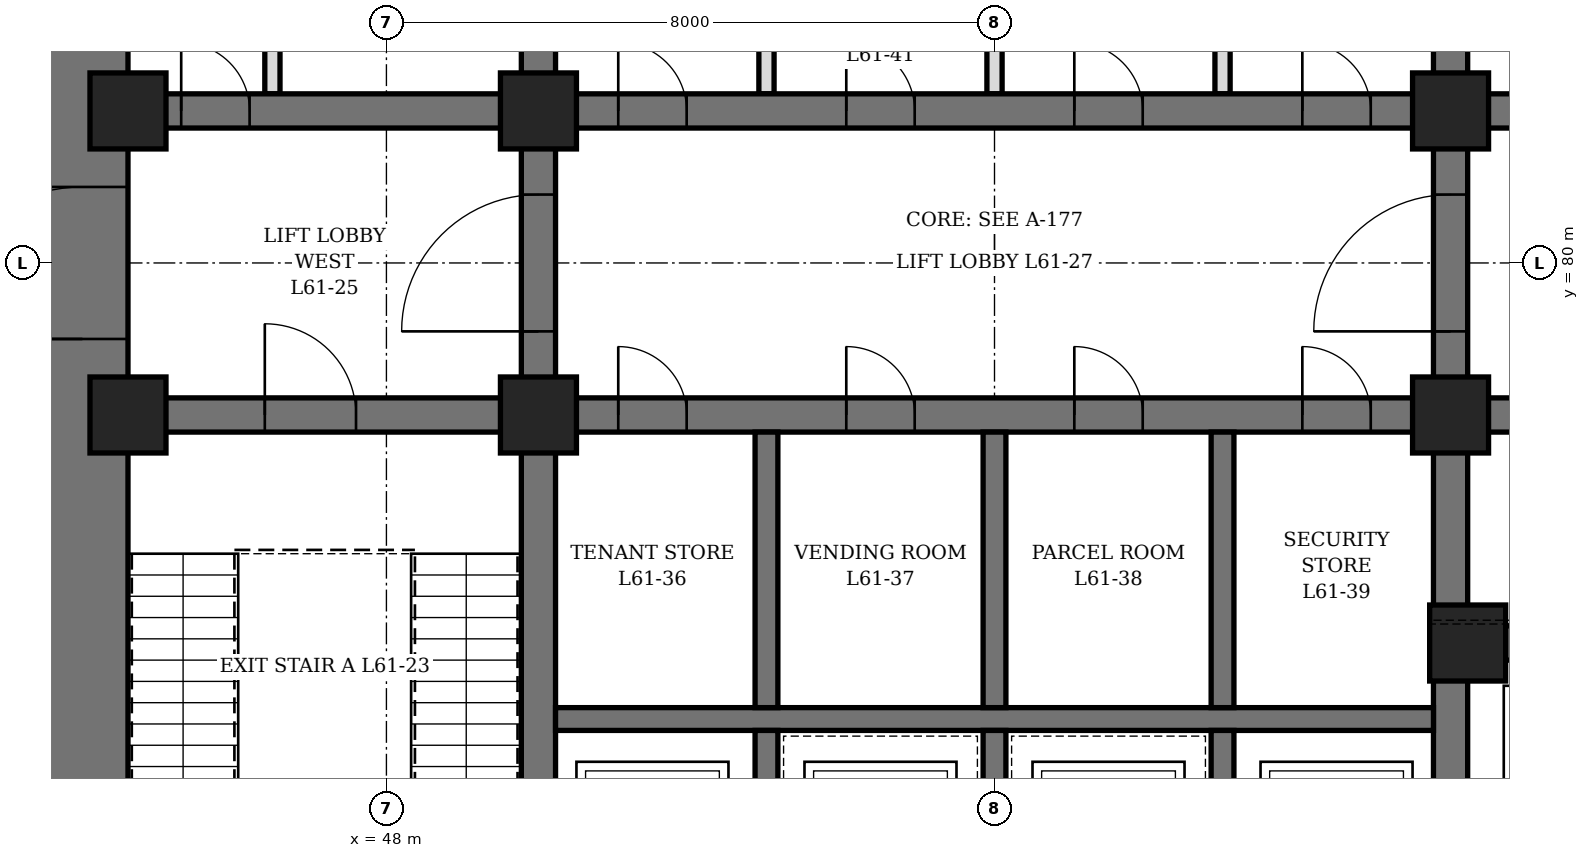
"""IFC4 building model, lengths in metres.
Left out: names, types, materials, properties, quantities, classifications, styles, units other than length and angle.
Written with IfcOpenShell. Run it as: python <this file> out.ifc"""

import sys

from ifc_helpers import new_model, si_unit, direction, frame, frame_2d, origin, origin_2d, place, context, subcontext, project, spatial, rectangle, hollow_rectangle, extrude, element, fill, save


model = new_model("IFC4")
c1 = context("Model", 3, precision=1e-05, world=origin(), true_north=direction((0.0, 1.0)))
c2 = subcontext(c1, "Body", "Model", "MODEL_VIEW")
j1 = project(units=[si_unit("LENGTHUNIT", "METRE"), si_unit("PLANEANGLEUNIT", "RADIAN")], contexts=[c1])
p1 = place(None, origin())
s1 = spatial("IfcSite", under=j1, at=p1, CompositionType="ELEMENT")
p2 = place(p1, origin())
s2 = spatial("IfcBuilding", under=s1, at=p2, CompositionType="ELEMENT")
p3 = place(p2, frame((0.0, 0.0, 271.3)))
s3 = spatial("IfcBuildingStorey", under=s2, at=p3, CompositionType="ELEMENT", Elevation=271.3)
p4 = place(p3, frame((44.0, 70.4, 0.0), z_axis=(0.0, 0.0, 1.0), x_axis=(0.0, 1.0, 0.0)))
e1 = element("IfcWall", 1, at=p4, inside=s3, PredefinedType="SHEAR", context=c2, shape_type="SweptSolid", body=[
    extrude(rectangle(XDim=19.2, YDim=1.2, at=frame_2d((9.6, 0.0))), origin(), (0.0, 0.0, 1.0), 4.2),
])
p5 = place(p4, frame((8.6, 0.0, 0.0)))
e2 = element("IfcOpeningElement", 2, at=p5, cuts=e1, PredefinedType="OPENING", context=c2, shape_type="SweptSolid", body=[
    extrude(rectangle(XDim=2.0, YDim=2.4, at=frame_2d((1.0, 1.2))), frame((0.0, 0.61, 0.0), z_axis=(0.0, -1.0, 0.0), x_axis=(1.0, 0.0, 0.0)), (0.0, 0.0, 1.0), 1.22),
])
p6 = place(p3, frame((50.0, 71.6, 0.0), z_axis=(0.0, 0.0, 1.0), x_axis=(0.0, 1.0, 0.0)))
e3 = element("IfcWall", 3, at=p6, inside=s3, PredefinedType="SHEAR", context=c2, shape_type="SweptSolid", body=[
    extrude(rectangle(XDim=16.8, YDim=0.45, at=frame_2d((8.4, 0.0))), origin(), (0.0, 0.0, 1.0), 4.2),
])
p7 = place(p6, frame((7.5, 0.0, 0.0)))
e4 = element("IfcOpeningElement", 4, at=p7, cuts=e3, PredefinedType="OPENING", context=c2, shape_type="SweptSolid", body=[
    extrude(rectangle(XDim=1.8, YDim=2.4, at=frame_2d((0.9, 1.2))), frame((0.0, 0.235, 0.0), z_axis=(0.0, -1.0, 0.0), x_axis=(1.0, 0.0, 0.0)), (0.0, 0.0, 1.0), 0.47),
])
p8 = place(p3, frame((62.0, 71.6, 0.0), z_axis=(0.0, 0.0, 1.0), x_axis=(0.0, 1.0, 0.0)))
e5 = element("IfcWall", 5, at=p8, inside=s3, PredefinedType="SHEAR", context=c2, shape_type="SweptSolid", body=[
    extrude(rectangle(XDim=16.8, YDim=0.45, at=frame_2d((8.4, 0.0))), origin(), (0.0, 0.0, 1.0), 4.2),
])
p9 = place(p8, frame((7.5, 0.0, 0.0)))
e6 = element("IfcOpeningElement", 6, at=p9, cuts=e5, PredefinedType="OPENING", context=c2, shape_type="SweptSolid", body=[
    extrude(rectangle(XDim=1.8, YDim=2.4, at=frame_2d((0.9, 1.2))), frame((0.0, 0.235, 0.0), z_axis=(0.0, -1.0, 0.0), x_axis=(1.0, 0.0, 0.0)), (0.0, 0.0, 1.0), 0.47),
])
p10 = place(p3, frame((44.6, 78.0, 0.0), z_axis=(0.0, 0.0, 1.0), x_axis=(1.0, 0.0, 0.0)))
e7 = element("IfcWall", 7, at=p10, inside=s3, PredefinedType="SHEAR", context=c2, shape_type="SweptSolid", body=[
    extrude(rectangle(XDim=5.175, YDim=0.45, at=frame_2d((2.587, 0.0))), origin(), (0.0, 0.0, 1.0), 4.2),
])
p11 = place(p10, frame((1.8, 0.0, 0.0)))
e8 = element("IfcOpeningElement", 8, at=p11, cuts=e7, PredefinedType="OPENING", context=c2, shape_type="SweptSolid", body=[
    extrude(rectangle(XDim=1.2, YDim=2.1, at=frame_2d((0.6, 1.05))), frame((0.0, 0.235, 0.0), z_axis=(0.0, -1.0, 0.0), x_axis=(1.0, 0.0, 0.0)), (0.0, 0.0, 1.0), 0.47),
])
p12 = place(p3, frame((44.6, 82.0, 0.0), z_axis=(0.0, 0.0, 1.0), x_axis=(1.0, 0.0, 0.0)))
e9 = element("IfcWall", 9, at=p12, inside=s3, PredefinedType="SHEAR", context=c2, shape_type="SweptSolid", body=[
    extrude(rectangle(XDim=5.175, YDim=0.45, at=frame_2d((2.587, 0.0))), origin(), (0.0, 0.0, 1.0), 4.2),
])
p13 = place(p12, frame((0.7, 0.0, 0.0)))
e10 = element("IfcOpeningElement", 10, at=p13, cuts=e9, PredefinedType="OPENING", context=c2, shape_type="SweptSolid", body=[
    extrude(rectangle(XDim=0.9, YDim=2.1, at=frame_2d((0.45, 1.05))), frame((0.0, 0.235, 0.0), z_axis=(0.0, -1.0, 0.0), x_axis=(1.0, 0.0, 0.0)), (0.0, 0.0, 1.0), 0.47),
])
p14 = place(p3, frame((62.225, 75.0, 0.0), z_axis=(0.0, 0.0, 1.0), x_axis=(1.0, 0.0, 0.0)))
e11 = element("IfcWall", 11, at=p14, inside=s3, PredefinedType="SHEAR", context=c2, shape_type="SweptSolid", body=[
    extrude(rectangle(XDim=5.175, YDim=0.45, at=frame_2d((2.587, 0.0))), origin(), (0.0, 0.0, 1.0), 4.2),
])
p15 = place(p14, frame((0.675, 0.0, 0.0)))
e12 = element("IfcOpeningElement", 12, at=p15, cuts=e11, PredefinedType="OPENING", context=c2, shape_type="SweptSolid", body=[
    extrude(rectangle(XDim=1.2, YDim=2.2, at=frame_2d((0.6, 1.1))), frame((0.0, 0.235, 0.0), z_axis=(0.0, -1.0, 0.0), x_axis=(1.0, 0.0, 0.0)), (0.0, 0.0, 1.0), 0.47),
])
p16 = place(p14, frame((3.425, 0.0, 0.0)))
e13 = element("IfcOpeningElement", 13, at=p16, cuts=e11, PredefinedType="OPENING", context=c2, shape_type="SweptSolid", body=[
    extrude(rectangle(XDim=1.2, YDim=2.2, at=frame_2d((0.6, 1.1))), frame((0.0, 0.235, 0.0), z_axis=(0.0, -1.0, 0.0), x_axis=(1.0, 0.0, 0.0)), (0.0, 0.0, 1.0), 0.47),
])
p17 = place(p3, frame((62.225, 78.0, 0.0), z_axis=(0.0, 0.0, 1.0), x_axis=(1.0, 0.0, 0.0)))
e14 = element("IfcWall", 14, at=p17, inside=s3, PredefinedType="SHEAR", context=c2, shape_type="SweptSolid", body=[
    extrude(rectangle(XDim=5.175, YDim=0.45, at=frame_2d((2.587, 0.0))), origin(), (0.0, 0.0, 1.0), 4.2),
])
p18 = place(p17, frame((2.175, 0.0, 0.0)))
e15 = element("IfcOpeningElement", 15, at=p18, cuts=e14, PredefinedType="OPENING", context=c2, shape_type="SweptSolid", body=[
    extrude(rectangle(XDim=1.2, YDim=2.1, at=frame_2d((0.6, 1.05))), frame((0.0, 0.235, 0.0), z_axis=(0.0, -1.0, 0.0), x_axis=(1.0, 0.0, 0.0)), (0.0, 0.0, 1.0), 0.47),
])
p19 = place(p3, frame((62.225, 82.0, 0.0), z_axis=(0.0, 0.0, 1.0), x_axis=(1.0, 0.0, 0.0)))
e16 = element("IfcWall", 16, at=p19, inside=s3, PredefinedType="SHEAR", context=c2, shape_type="SweptSolid", body=[
    extrude(rectangle(XDim=5.175, YDim=0.45, at=frame_2d((2.587, 0.0))), origin(), (0.0, 0.0, 1.0), 4.2),
])
p20 = place(p19, frame((2.175, 0.0, 0.0)))
e17 = element("IfcOpeningElement", 17, at=p20, cuts=e16, PredefinedType="OPENING", context=c2, shape_type="SweptSolid", body=[
    extrude(rectangle(XDim=1.2, YDim=2.1, at=frame_2d((0.6, 1.05))), frame((0.0, 0.235, 0.0), z_axis=(0.0, -1.0, 0.0), x_axis=(1.0, 0.0, 0.0)), (0.0, 0.0, 1.0), 0.47),
])
p21 = place(p3, frame((50.225, 78.0, 0.0), z_axis=(0.0, 0.0, 1.0), x_axis=(1.0, 0.0, 0.0)))
e18 = element("IfcWall", 18, at=p21, inside=s3, PredefinedType="SHEAR", context=c2, shape_type="SweptSolid", body=[
    extrude(rectangle(XDim=11.55, YDim=0.45, at=frame_2d((5.775, 0.0))), origin(), (0.0, 0.0, 1.0), 4.2),
])
p22 = place(p21, frame((0.825, 0.0, 0.0)))
e19 = element("IfcOpeningElement", 19, at=p22, cuts=e18, PredefinedType="OPENING", context=c2, shape_type="SweptSolid", body=[
    extrude(rectangle(XDim=0.9, YDim=2.1, at=frame_2d((0.45, 1.05))), frame((0.0, 0.235, 0.0), z_axis=(0.0, -1.0, 0.0), x_axis=(1.0, 0.0, 0.0)), (0.0, 0.0, 1.0), 0.47),
])
p23 = place(p21, frame((3.825, 0.0, 0.0)))
e20 = element("IfcOpeningElement", 20, at=p23, cuts=e18, PredefinedType="OPENING", context=c2, shape_type="SweptSolid", body=[
    extrude(rectangle(XDim=0.9, YDim=2.1, at=frame_2d((0.45, 1.05))), frame((0.0, 0.235, 0.0), z_axis=(0.0, -1.0, 0.0), x_axis=(1.0, 0.0, 0.0)), (0.0, 0.0, 1.0), 0.47),
])
p24 = place(p21, frame((6.825, 0.0, 0.0)))
e21 = element("IfcOpeningElement", 21, at=p24, cuts=e18, PredefinedType="OPENING", context=c2, shape_type="SweptSolid", body=[
    extrude(rectangle(XDim=0.9, YDim=2.1, at=frame_2d((0.45, 1.05))), frame((0.0, 0.235, 0.0), z_axis=(0.0, -1.0, 0.0), x_axis=(1.0, 0.0, 0.0)), (0.0, 0.0, 1.0), 0.47),
])
p25 = place(p21, frame((9.825, 0.0, 0.0)))
e22 = element("IfcOpeningElement", 22, at=p25, cuts=e18, PredefinedType="OPENING", context=c2, shape_type="SweptSolid", body=[
    extrude(rectangle(XDim=0.9, YDim=2.1, at=frame_2d((0.45, 1.05))), frame((0.0, 0.235, 0.0), z_axis=(0.0, -1.0, 0.0), x_axis=(1.0, 0.0, 0.0)), (0.0, 0.0, 1.0), 0.47),
])
p26 = place(p3, frame((50.225, 82.0, 0.0), z_axis=(0.0, 0.0, 1.0), x_axis=(1.0, 0.0, 0.0)))
e23 = element("IfcWall", 23, at=p26, inside=s3, PredefinedType="SHEAR", context=c2, shape_type="SweptSolid", body=[
    extrude(rectangle(XDim=11.55, YDim=0.45, at=frame_2d((5.775, 0.0))), origin(), (0.0, 0.0, 1.0), 4.2),
])
p27 = place(p26, frame((0.825, 0.0, 0.0)))
e24 = element("IfcOpeningElement", 24, at=p27, cuts=e23, PredefinedType="OPENING", context=c2, shape_type="SweptSolid", body=[
    extrude(rectangle(XDim=0.9, YDim=2.1, at=frame_2d((0.45, 1.05))), frame((0.0, 0.235, 0.0), z_axis=(0.0, -1.0, 0.0), x_axis=(1.0, 0.0, 0.0)), (0.0, 0.0, 1.0), 0.47),
])
p28 = place(p26, frame((3.825, 0.0, 0.0)))
e25 = element("IfcOpeningElement", 25, at=p28, cuts=e23, PredefinedType="OPENING", context=c2, shape_type="SweptSolid", body=[
    extrude(rectangle(XDim=0.9, YDim=2.1, at=frame_2d((0.45, 1.05))), frame((0.0, 0.235, 0.0), z_axis=(0.0, -1.0, 0.0), x_axis=(1.0, 0.0, 0.0)), (0.0, 0.0, 1.0), 0.47),
])
p29 = place(p26, frame((6.825, 0.0, 0.0)))
e26 = element("IfcOpeningElement", 26, at=p29, cuts=e23, PredefinedType="OPENING", context=c2, shape_type="SweptSolid", body=[
    extrude(rectangle(XDim=0.9, YDim=2.1, at=frame_2d((0.45, 1.05))), frame((0.0, 0.235, 0.0), z_axis=(0.0, -1.0, 0.0), x_axis=(1.0, 0.0, 0.0)), (0.0, 0.0, 1.0), 0.47),
])
p30 = place(p26, frame((9.825, 0.0, 0.0)))
e27 = element("IfcOpeningElement", 27, at=p30, cuts=e23, PredefinedType="OPENING", context=c2, shape_type="SweptSolid", body=[
    extrude(rectangle(XDim=0.9, YDim=2.1, at=frame_2d((0.45, 1.05))), frame((0.0, 0.235, 0.0), z_axis=(0.0, -1.0, 0.0), x_axis=(1.0, 0.0, 0.0)), (0.0, 0.0, 1.0), 0.47),
])
p31 = place(p3, frame((50.225, 74.0, 0.0), z_axis=(0.0, 0.0, 1.0), x_axis=(1.0, 0.0, 0.0)))
e28 = element("IfcWall", 28, at=p31, inside=s3, PredefinedType="SHEAR", context=c2, shape_type="SweptSolid", body=[
    extrude(rectangle(XDim=11.55, YDim=0.3, at=frame_2d((5.775, 0.0))), origin(), (0.0, 0.0, 1.0), 4.2),
])
p32 = place(p3, frame((53.0, 71.6, 0.0), z_axis=(0.0, 0.0, 1.0), x_axis=(0.0, 1.0, 0.0)))
e29 = element("IfcWall", 29, at=p32, inside=s3, PredefinedType="SHEAR", context=c2, shape_type="SweptSolid", body=[
    extrude(rectangle(XDim=2.25, YDim=0.3, at=frame_2d((1.125, 0.0))), origin(), (0.0, 0.0, 1.0), 4.2),
])
p33 = place(p3, frame((53.0, 74.15, 0.0), z_axis=(0.0, 0.0, 1.0), x_axis=(0.0, 1.0, 0.0)))
e30 = element("IfcWall", 30, at=p33, inside=s3, PredefinedType="SHEAR", context=c2, shape_type="SweptSolid", body=[
    extrude(rectangle(XDim=3.625, YDim=0.3, at=frame_2d((1.812, 0.0))), origin(), (0.0, 0.0, 1.0), 4.2),
])
p34 = place(p3, frame((56.0, 71.6, 0.0), z_axis=(0.0, 0.0, 1.0), x_axis=(0.0, 1.0, 0.0)))
e31 = element("IfcWall", 31, at=p34, inside=s3, PredefinedType="SHEAR", context=c2, shape_type="SweptSolid", body=[
    extrude(rectangle(XDim=2.25, YDim=0.3, at=frame_2d((1.125, 0.0))), origin(), (0.0, 0.0, 1.0), 4.2),
])
p35 = place(p3, frame((56.0, 74.15, 0.0), z_axis=(0.0, 0.0, 1.0), x_axis=(0.0, 1.0, 0.0)))
e32 = element("IfcWall", 32, at=p35, inside=s3, PredefinedType="SHEAR", context=c2, shape_type="SweptSolid", body=[
    extrude(rectangle(XDim=3.625, YDim=0.3, at=frame_2d((1.812, 0.0))), origin(), (0.0, 0.0, 1.0), 4.2),
])
p36 = place(p3, frame((59.0, 71.6, 0.0), z_axis=(0.0, 0.0, 1.0), x_axis=(0.0, 1.0, 0.0)))
e33 = element("IfcWall", 33, at=p36, inside=s3, PredefinedType="SHEAR", context=c2, shape_type="SweptSolid", body=[
    extrude(rectangle(XDim=2.25, YDim=0.3, at=frame_2d((1.125, 0.0))), origin(), (0.0, 0.0, 1.0), 4.2),
])
p37 = place(p3, frame((59.0, 74.15, 0.0), z_axis=(0.0, 0.0, 1.0), x_axis=(0.0, 1.0, 0.0)))
e34 = element("IfcWall", 34, at=p37, inside=s3, PredefinedType="SHEAR", context=c2, shape_type="SweptSolid", body=[
    extrude(rectangle(XDim=3.625, YDim=0.3, at=frame_2d((1.812, 0.0))), origin(), (0.0, 0.0, 1.0), 4.2),
])
for number, where, z_axis, x_axis in (
    (35, (44.6, 78.0, 0.0), (0.0, 0.0, 1.0), (1.0, 0.0, 0.0)),
    (36, (44.6, 82.0, 0.0), (0.0, 0.0, 1.0), (1.0, 0.0, 0.0)),
    (37, (50.0, 78.0, 0.0), (0.0, 0.0, 1.0), (1.0, 0.0, 0.0)),
    (38, (50.0, 82.0, 0.0), (0.0, 0.0, 1.0), (1.0, 0.0, 0.0)),
    (39, (62.0, 78.0, 0.0), (0.0, 0.0, 1.0), (1.0, 0.0, 0.0)),
    (40, (62.0, 82.0, 0.0), (0.0, 0.0, 1.0), (1.0, 0.0, 0.0)),
    (41, (62.225, 75.0, 0.0), (0.0, 0.0, 1.0), (1.0, 0.0, 0.0)),
):
    element("IfcColumn", number, at=place(p3, frame(where, z_axis=z_axis, x_axis=x_axis)), inside=s3, PredefinedType="COLUMN", context=c2, shape_type="SweptSolid", body=[
        extrude(hollow_rectangle(XDim=1.0, YDim=1.0, WallThickness=0.15, at=origin_2d()), origin(), (0.0, 0.0, 1.0), 4.2),
    ])
p38 = place(p3, frame((46.5, 82.225, 0.0), z_axis=(0.0, 0.0, 1.0), x_axis=(0.0, 1.0, 0.0)))
e42 = element("IfcWall", 42, at=p38, inside=s3, PredefinedType="PARTITIONING", context=c2, shape_type="SweptSolid", body=[
    extrude(rectangle(XDim=3.05, YDim=0.2, at=frame_2d((1.525, 0.0))), origin(), (0.0, 0.0, 1.0), 4.04),
])
p39 = place(p38, frame((1.075, 0.0, 0.0)))
e43 = element("IfcOpeningElement", 43, at=p39, cuts=e42, PredefinedType="OPENING", context=c2, shape_type="SweptSolid", body=[
    extrude(rectangle(XDim=0.9, YDim=2.1, at=frame_2d((0.45, 1.05))), frame((0.0, 0.11, 0.0), z_axis=(0.0, -1.0, 0.0), x_axis=(1.0, 0.0, 0.0)), (0.0, 0.0, 1.0), 0.22),
])
p40 = place(p3, frame((53.0, 82.225, 0.0), z_axis=(0.0, 0.0, 1.0), x_axis=(0.0, 1.0, 0.0)))
e44 = element("IfcWall", 44, at=p40, inside=s3, PredefinedType="PARTITIONING", context=c2, shape_type="SweptSolid", body=[
    extrude(rectangle(XDim=3.55, YDim=0.2, at=frame_2d((1.775, 0.0))), origin(), (0.0, 0.0, 1.0), 4.04),
])
p41 = place(p3, frame((56.0, 82.225, 0.0), z_axis=(0.0, 0.0, 1.0), x_axis=(0.0, 1.0, 0.0)))
e45 = element("IfcWall", 45, at=p41, inside=s3, PredefinedType="PARTITIONING", context=c2, shape_type="SweptSolid", body=[
    extrude(rectangle(XDim=3.55, YDim=0.2, at=frame_2d((1.775, 0.0))), origin(), (0.0, 0.0, 1.0), 2.54),
])
p42 = place(p3, frame((59.0, 82.225, 0.0), z_axis=(0.0, 0.0, 1.0), x_axis=(0.0, 1.0, 0.0)))
e46 = element("IfcWall", 46, at=p42, inside=s3, PredefinedType="PARTITIONING", context=c2, shape_type="SweptSolid", body=[
    extrude(rectangle(XDim=3.55, YDim=0.2, at=frame_2d((1.775, 0.0))), origin(), (0.0, 0.0, 1.0), 4.04),
])
p43 = place(p13, origin())
e47 = element("IfcDoor", 47, at=p43, inside=s3, OperationType="SINGLE_SWING_LEFT", PredefinedType="DOOR", context=c2, shape_type="SweptSolid", body=[
    extrude(rectangle(XDim=0.9, YDim=2.1, at=frame_2d((0.45, 1.05))), frame((0.0, 0.225, 0.0), z_axis=(0.0, -1.0, 0.0), x_axis=(1.0, 0.0, 0.0)), (0.0, 0.0, 1.0), 0.449),
])
fill(e10, e47)
p44 = place(p22, origin())
e48 = element("IfcDoor", 48, at=p44, inside=s3, OperationType="SINGLE_SWING_LEFT", PredefinedType="DOOR", context=c2, shape_type="SweptSolid", body=[
    extrude(rectangle(XDim=0.9, YDim=2.1, at=frame_2d((0.45, 1.05))), frame((0.0, 0.225, 0.0), z_axis=(0.0, -1.0, 0.0), x_axis=(1.0, 0.0, 0.0)), (0.0, 0.0, 1.0), 0.449),
])
fill(e19, e48)
p45 = place(p23, origin())
e49 = element("IfcDoor", 49, at=p45, inside=s3, OperationType="SINGLE_SWING_LEFT", PredefinedType="DOOR", context=c2, shape_type="SweptSolid", body=[
    extrude(rectangle(XDim=0.9, YDim=2.1, at=frame_2d((0.45, 1.05))), frame((0.0, 0.225, 0.0), z_axis=(0.0, -1.0, 0.0), x_axis=(1.0, 0.0, 0.0)), (0.0, 0.0, 1.0), 0.449),
])
fill(e20, e49)
p46 = place(p24, origin())
e50 = element("IfcDoor", 50, at=p46, inside=s3, OperationType="SINGLE_SWING_LEFT", PredefinedType="DOOR", context=c2, shape_type="SweptSolid", body=[
    extrude(rectangle(XDim=0.9, YDim=2.1, at=frame_2d((0.45, 1.05))), frame((0.0, 0.225, 0.0), z_axis=(0.0, -1.0, 0.0), x_axis=(1.0, 0.0, 0.0)), (0.0, 0.0, 1.0), 0.449),
])
fill(e21, e50)
p47 = place(p25, origin())
e51 = element("IfcDoor", 51, at=p47, inside=s3, OperationType="SINGLE_SWING_LEFT", PredefinedType="DOOR", context=c2, shape_type="SweptSolid", body=[
    extrude(rectangle(XDim=0.9, YDim=2.1, at=frame_2d((0.45, 1.05))), frame((0.0, 0.225, 0.0), z_axis=(0.0, -1.0, 0.0), x_axis=(1.0, 0.0, 0.0)), (0.0, 0.0, 1.0), 0.449),
])
fill(e22, e51)
p48 = place(p27, origin())
e52 = element("IfcDoor", 52, at=p48, inside=s3, OperationType="SINGLE_SWING_LEFT", PredefinedType="DOOR", context=c2, shape_type="SweptSolid", body=[
    extrude(rectangle(XDim=0.9, YDim=2.1, at=frame_2d((0.45, 1.05))), frame((0.0, 0.225, 0.0), z_axis=(0.0, -1.0, 0.0), x_axis=(1.0, 0.0, 0.0)), (0.0, 0.0, 1.0), 0.449),
])
fill(e24, e52)
p49 = place(p28, origin())
e53 = element("IfcDoor", 53, at=p49, inside=s3, OperationType="SINGLE_SWING_LEFT", PredefinedType="DOOR", context=c2, shape_type="SweptSolid", body=[
    extrude(rectangle(XDim=0.9, YDim=2.1, at=frame_2d((0.45, 1.05))), frame((0.0, 0.225, 0.0), z_axis=(0.0, -1.0, 0.0), x_axis=(1.0, 0.0, 0.0)), (0.0, 0.0, 1.0), 0.449),
])
fill(e25, e53)
p50 = place(p29, origin())
e54 = element("IfcDoor", 54, at=p50, inside=s3, OperationType="SINGLE_SWING_LEFT", PredefinedType="DOOR", context=c2, shape_type="SweptSolid", body=[
    extrude(rectangle(XDim=0.9, YDim=2.1, at=frame_2d((0.45, 1.05))), frame((0.0, 0.225, 0.0), z_axis=(0.0, -1.0, 0.0), x_axis=(1.0, 0.0, 0.0)), (0.0, 0.0, 1.0), 0.449),
])
fill(e26, e54)
p51 = place(p30, origin())
e55 = element("IfcDoor", 55, at=p51, inside=s3, OperationType="SINGLE_SWING_LEFT", PredefinedType="DOOR", context=c2, shape_type="SweptSolid", body=[
    extrude(rectangle(XDim=0.9, YDim=2.1, at=frame_2d((0.45, 1.05))), frame((0.0, 0.225, 0.0), z_axis=(0.0, -1.0, 0.0), x_axis=(1.0, 0.0, 0.0)), (0.0, 0.0, 1.0), 0.449),
])
fill(e27, e55)
p52 = place(p11, origin())
e56 = element("IfcDoor", 56, at=p52, inside=s3, OperationType="SINGLE_SWING_LEFT", PredefinedType="DOOR", context=c2, shape_type="SweptSolid", body=[
    extrude(rectangle(XDim=1.2, YDim=2.1, at=frame_2d((0.6, 1.05))), frame((0.0, 0.225, 0.0), z_axis=(0.0, -1.0, 0.0), x_axis=(1.0, 0.0, 0.0)), (0.0, 0.0, 1.0), 0.449),
])
fill(e8, e56)
p53 = place(p5, origin())
e57 = element("IfcDoor", 57, at=p53, inside=s3, OperationType="DOUBLE_DOOR_SINGLE_SWING", PredefinedType="DOOR", context=c2, shape_type="SweptSolid", body=[
    extrude(rectangle(XDim=2.0, YDim=2.4, at=frame_2d((1.0, 1.2))), frame((0.0, 0.35, 0.0), z_axis=(0.0, -1.0, 0.0), x_axis=(1.0, 0.0, 0.0)), (0.0, 0.0, 1.0), 0.7),
])
fill(e2, e57)
p54 = place(p7, origin())
e58 = element("IfcDoor", 58, at=p54, inside=s3, OperationType="DOUBLE_DOOR_SINGLE_SWING", PredefinedType="DOOR", context=c2, shape_type="SweptSolid", body=[
    extrude(rectangle(XDim=1.8, YDim=2.4, at=frame_2d((0.9, 1.2))), frame((0.0, 0.225, 0.0), z_axis=(0.0, -1.0, 0.0), x_axis=(1.0, 0.0, 0.0)), (0.0, 0.0, 1.0), 0.449),
])
fill(e4, e58)
p55 = place(p9, origin())
e59 = element("IfcDoor", 59, at=p55, inside=s3, OperationType="DOUBLE_DOOR_SINGLE_SWING", PredefinedType="DOOR", context=c2, shape_type="SweptSolid", body=[
    extrude(rectangle(XDim=1.8, YDim=2.4, at=frame_2d((0.9, 1.2))), frame((0.0, 0.225, 0.0), z_axis=(0.0, -1.0, 0.0), x_axis=(1.0, 0.0, 0.0)), (0.0, 0.0, 1.0), 0.449),
])
fill(e6, e59)
save(model, sys.argv[1])
